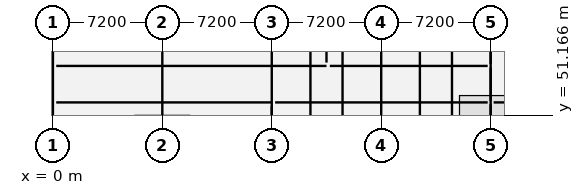
"""IFC4 building model, lengths in metres.
Left out: names, types, materials, properties, quantities, classifications, styles, units other than length and angle.
Written with IfcOpenShell. Run it as: python <this file> out.ifc"""

import sys

from ifc_helpers import new_model, si_unit, direction, frame, frame_2d, origin, place, context, subcontext, project, spatial, rectangle, extrude, element, fill, save


model = new_model("IFC4")
c1 = context("Model", 3, precision=1e-05, world=origin(), true_north=direction((0.0, 1.0)))
c2 = subcontext(c1, "Body", "Model", "MODEL_VIEW")
j1 = project(units=[si_unit("LENGTHUNIT", "METRE"), si_unit("PLANEANGLEUNIT", "RADIAN")], contexts=[c1])
p1 = place(None, origin())
s1 = spatial("IfcSite", under=j1, at=p1, CompositionType="ELEMENT")
p2 = place(p1, origin())
s2 = spatial("IfcBuilding", under=s1, at=p2, CompositionType="ELEMENT")
p3 = place(p2, origin())
s3 = spatial("IfcBuildingStorey", under=s2, at=p3, CompositionType="ELEMENT", Elevation=0.0)
p4 = place(p3, frame((0.0, 50.7, 0.0), z_axis=(0.0, 0.0, 1.0), x_axis=(0.0, 1.0, 0.0)))
e1 = element("IfcWall", 1, at=p4, inside=s3, PredefinedType="ELEMENTEDWALL", context=c2, shape_type="SweptSolid", body=[
    extrude(rectangle(XDim=6.6, YDim=0.32, at=frame_2d((3.3, 0.0))), origin(), (0.0, 0.0, 1.0), 4.49),
])
p5 = place(p3, frame((28.8, 52.1, 0.0), z_axis=(0.0, 0.0, 1.0), x_axis=(0.0, 1.0, 0.0)))
e2 = element("IfcWall", 2, at=p5, inside=s3, PredefinedType="PARTITIONING", context=c2, shape_type="SweptSolid", body=[
    extrude(rectangle(XDim=2.2, YDim=0.14, at=frame_2d((1.1, 0.0))), origin(), (0.0, 0.0, 1.0), 4.488),
])
p6 = place(p5, frame((0.25, 0.0, 0.0)))
e3 = element("IfcOpeningElement", 3, at=p6, cuts=e2, PredefinedType="OPENING", context=c2, shape_type="SweptSolid", body=[
    extrude(rectangle(XDim=1.65, YDim=2.2, at=frame_2d((0.825, 1.1))), frame((0.0, 0.082, 0.0), z_axis=(0.0, -1.0, 0.0), x_axis=(1.0, 0.0, 0.0)), (0.0, 0.0, 1.0), 0.164),
])
p7 = place(p3, frame((0.22, 52.0, 0.0), z_axis=(0.0, 0.0, 1.0), x_axis=(1.0, 0.0, 0.0)))
e4 = element("IfcWall", 4, at=p7, inside=s3, PredefinedType="PARTITIONING", context=c2, shape_type="SweptSolid", body=[
    extrude(rectangle(XDim=14.18, YDim=0.12, at=frame_2d((7.09, 0.0))), origin(), (0.0, 0.0, 1.0), 4.488),
])
p8 = place(p7, frame((7.59, 0.0, 0.0)))
e5 = element("IfcOpeningElement", 5, at=p8, cuts=e4, PredefinedType="OPENING", context=c2, shape_type="SweptSolid", body=[
    extrude(rectangle(XDim=1.0, YDim=2.15, at=frame_2d((0.5, 1.075))), frame((0.0, 0.072, 0.0), z_axis=(0.0, -1.0, 0.0), x_axis=(1.0, 0.0, 0.0)), (0.0, 0.0, 1.0), 0.144),
])
p9 = place(p3, frame((14.4, 50.74, 0.0), z_axis=(0.0, 0.0, 1.0), x_axis=(0.0, 1.0, 0.0)))
e6 = element("IfcWall", 6, at=p9, inside=s3, PredefinedType="PARTITIONING", context=c2, shape_type="SweptSolid", body=[
    extrude(rectangle(XDim=1.04, YDim=0.12, at=frame_2d((0.52, 0.0))), origin(), (0.0, 0.0, 1.0), 4.498),
])
p10 = place(p3, frame((14.62, 52.0, 0.0), z_axis=(0.0, 0.0, 1.0), x_axis=(1.0, 0.0, 0.0)))
e7 = element("IfcWall", 7, at=p10, inside=s3, PredefinedType="PARTITIONING", context=c2, shape_type="SweptSolid", body=[
    extrude(rectangle(XDim=13.984, YDim=0.1, at=frame_2d((6.992, 0.0))), origin(), (0.0, 0.0, 1.0), 4.498),
])
p11 = place(p10, frame((5.492, 0.0, 0.0)))
e8 = element("IfcOpeningElement", 8, at=p11, cuts=e7, PredefinedType="OPENING", context=c2, shape_type="SweptSolid", body=[
    extrude(rectangle(XDim=1.0, YDim=2.15, at=frame_2d((0.5, 1.075))), frame((0.0, 0.062, 0.0), z_axis=(0.0, -1.0, 0.0), x_axis=(1.0, 0.0, 0.0)), (0.0, 0.0, 1.0), 0.124),
])
p12 = place(p3, frame((28.8, 50.74, 0.0), z_axis=(0.0, 0.0, 1.0), x_axis=(0.0, 1.0, 0.0)))
e9 = element("IfcWall", 9, at=p12, inside=s3, PredefinedType="PARTITIONING", context=c2, shape_type="SweptSolid", body=[
    extrude(rectangle(XDim=1.14, YDim=0.1, at=frame_2d((0.57, 0.0))), origin(), (0.0, 0.0, 1.0), 4.488),
])
p13 = place(p3, frame((0.22, 54.4, 0.0), z_axis=(0.0, 0.0, 1.0), x_axis=(1.0, 0.0, 0.0)))
e10 = element("IfcWall", 10, at=p13, inside=s3, PredefinedType="PARTITIONING", context=c2, shape_type="SweptSolid", body=[
    extrude(rectangle(XDim=17.78, YDim=0.12, at=frame_2d((8.89, 0.0))), origin(), (0.0, 0.0, 1.0), 4.488),
])
p14 = place(p13, frame((8.39, 0.0, 0.0)))
e11 = element("IfcOpeningElement", 11, at=p14, cuts=e10, PredefinedType="OPENING", context=c2, shape_type="SweptSolid", body=[
    extrude(rectangle(XDim=1.0, YDim=2.15, at=frame_2d((0.5, 1.075))), frame((0.0, 0.072, 0.0), z_axis=(0.0, -1.0, 0.0), x_axis=(1.0, 0.0, 0.0)), (0.0, 0.0, 1.0), 0.144),
])
p15 = place(p3, frame((18.0, 54.62, 0.0), z_axis=(0.0, 0.0, 1.0), x_axis=(0.0, 1.0, 0.0)))
e12 = element("IfcWall", 12, at=p15, inside=s3, PredefinedType="PARTITIONING", context=c2, shape_type="SweptSolid", body=[
    extrude(rectangle(XDim=2.76, YDim=0.12, at=frame_2d((1.38, 0.0))), origin(), (0.0, 0.0, 1.0), 4.448),
])
p16 = place(p3, frame((18.22, 54.4, 0.0), z_axis=(0.0, 0.0, 1.0), x_axis=(1.0, 0.0, 0.0)))
e13 = element("IfcWall", 13, at=p16, inside=s3, PredefinedType="PLUMBINGWALL", context=c2, shape_type="SweptSolid", body=[
    extrude(rectangle(XDim=10.384, YDim=0.18, at=frame_2d((5.192, 0.0))), origin(), (0.0, 0.0, 1.0), 4.498),
])
p17 = place(p16, frame((4.742, 0.0, 0.0)))
e14 = element("IfcOpeningElement", 14, at=p17, cuts=e13, PredefinedType="OPENING", context=c2, shape_type="SweptSolid", body=[
    extrude(rectangle(XDim=0.9, YDim=2.1, at=frame_2d((0.45, 1.05))), frame((0.0, 0.102, 0.0), z_axis=(0.0, -1.0, 0.0), x_axis=(1.0, 0.0, 0.0)), (0.0, 0.0, 1.0), 0.204),
])
p18 = place(p3, frame((28.8, 54.52, 0.0), z_axis=(0.0, 0.0, 1.0), x_axis=(0.0, 1.0, 0.0)))
e15 = element("IfcWall", 15, at=p18, inside=s3, PredefinedType="PLUMBINGWALL", context=c2, shape_type="SweptSolid", body=[
    extrude(rectangle(XDim=2.74, YDim=0.18, at=frame_2d((1.37, 0.0))), origin(), (0.0, 0.0, 1.0), 4.488),
])
p19 = place(p3, frame((28.996, 52.0, 0.0), z_axis=(0.0, 0.0, 1.0), x_axis=(1.0, 0.0, 0.0)))
e16 = element("IfcWall", 16, at=p19, inside=s3, PredefinedType="PLUMBINGWALL", context=c2, shape_type="SweptSolid", body=[
    extrude(rectangle(XDim=9.404, YDim=0.18, at=frame_2d((4.702, 0.0))), origin(), (0.0, 0.0, 1.0), 4.488),
])
p20 = place(p19, frame((4.202, 0.0, 0.0)))
e17 = element("IfcOpeningElement", 17, at=p20, cuts=e16, PredefinedType="OPENING", context=c2, shape_type="SweptSolid", body=[
    extrude(rectangle(XDim=1.0, YDim=2.15, at=frame_2d((0.5, 1.075))), frame((0.0, 0.102, 0.0), z_axis=(0.0, -1.0, 0.0), x_axis=(1.0, 0.0, 0.0)), (0.0, 0.0, 1.0), 0.204),
])
p21 = place(p6, origin())
e18 = element("IfcDoor", 18, at=p21, inside=s3, OperationType="DOUBLE_SWING_LEFT", PredefinedType="DOOR", context=c2, shape_type="SweptSolid", body=[
    extrude(rectangle(XDim=1.65, YDim=2.2, at=frame_2d((0.825, 1.1))), frame((0.0, 0.025, 0.0), z_axis=(0.0, -1.0, 0.0), x_axis=(1.0, 0.0, 0.0)), (0.0, 0.0, 1.0), 0.05),
])
fill(e3, e18)
p22 = place(p8, origin())
e19 = element("IfcDoor", 19, at=p22, inside=s3, OperationType="SINGLE_SWING_LEFT", PredefinedType="DOOR", context=c2, shape_type="SweptSolid", body=[
    extrude(rectangle(XDim=1.0, YDim=2.15, at=frame_2d((0.5, 1.075))), frame((0.0, 0.025, 0.0), z_axis=(0.0, -1.0, 0.0), x_axis=(1.0, 0.0, 0.0)), (0.0, 0.0, 1.0), 0.05),
])
fill(e5, e19)
p23 = place(p11, origin())
e20 = element("IfcDoor", 20, at=p23, inside=s3, OperationType="SINGLE_SWING_RIGHT", PredefinedType="DOOR", context=c2, shape_type="SweptSolid", body=[
    extrude(rectangle(XDim=1.0, YDim=2.15, at=frame_2d((0.5, 1.075))), frame((0.0, 0.025, 0.0), z_axis=(0.0, -1.0, 0.0), x_axis=(1.0, 0.0, 0.0)), (0.0, 0.0, 1.0), 0.05),
])
fill(e8, e20)
p24 = place(p14, origin())
e21 = element("IfcDoor", 21, at=p24, inside=s3, OperationType="SINGLE_SWING_LEFT", PredefinedType="DOOR", context=c2, shape_type="SweptSolid", body=[
    extrude(rectangle(XDim=1.0, YDim=2.15, at=frame_2d((0.5, 1.075))), frame((0.0, 0.025, 0.0), z_axis=(0.0, -1.0, 0.0), x_axis=(1.0, 0.0, 0.0)), (0.0, 0.0, 1.0), 0.05),
])
fill(e11, e21)
p25 = place(p17, origin())
e22 = element("IfcDoor", 22, at=p25, inside=s3, OperationType="SINGLE_SWING_RIGHT", PredefinedType="DOOR", context=c2, shape_type="SweptSolid", body=[
    extrude(rectangle(XDim=0.9, YDim=2.1, at=frame_2d((0.45, 1.05))), frame((0.0, 0.025, 0.0), z_axis=(0.0, -1.0, 0.0), x_axis=(1.0, 0.0, 0.0)), (0.0, 0.0, 1.0), 0.05),
])
fill(e14, e22)
save(model, sys.argv[1])
